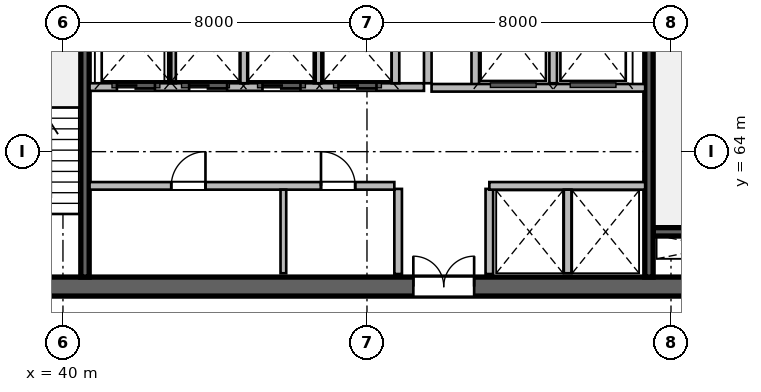
"""IFC4 building model, lengths in metres.
Left out: names, types, materials, properties, quantities, classifications, styles, units other than length and angle.
Written with IfcOpenShell. Run it as: python <this file> out.ifc"""

import sys

from ifc_helpers import new_model, si_unit, direction, frame, frame_2d, origin, place, context, subcontext, project, spatial, rectangle, extrude, source, transform, mapped, element, fill, save


model = new_model("IFC4")
c1 = context("Model", 3, precision=1e-05, world=origin(), true_north=direction((0.0, 1.0)))
c2 = subcontext(c1, "Body", "Model", "MODEL_VIEW")
j1 = project(units=[si_unit("LENGTHUNIT", "METRE"), si_unit("PLANEANGLEUNIT", "RADIAN")], contexts=[c1])
p1 = place(None, origin())
s1 = spatial("IfcSite", under=j1, at=p1, CompositionType="ELEMENT")
p2 = place(p1, origin())
s2 = spatial("IfcBuilding", under=s1, at=p2, CompositionType="ELEMENT")
p3 = place(p2, frame((0.0, 0.0, 115.5)))
s3 = spatial("IfcBuildingStorey", under=s2, at=p3, CompositionType="ELEMENT", Elevation=115.5)
m1 = source(origin(), c2, "Body", "SweptSolid", [
    extrude(rectangle(XDim=21.6, YDim=0.5, at=frame_2d((10.8, 0.0))), origin(), (0.0, 0.0, 1.0), 3.9),
])
p4 = place(p3, frame((37.2, 60.45, 0.0), z_axis=(0.0, 0.0, 1.0), x_axis=(1.0, 0.0, 0.0)))
e1 = element("IfcWall", 1, at=p4, inside=s3, PredefinedType="SHEAR", context=c2, shape_type="MappedRepresentation", body=[
    mapped(m1, transform((0.0, 0.0, 0.0), scale=1.0)),
])
p5 = place(p4, frame((1.1, 0.0, 0.0)))
e2 = element("IfcOpeningElement", 2, at=p5, cuts=e1, PredefinedType="OPENING", context=c2, shape_type="SweptSolid", body=[
    extrude(rectangle(XDim=1.15, YDim=2.15, at=frame_2d((0.575, 1.075))), frame((0.0, 0.26, 0.0), z_axis=(0.0, -1.0, 0.0), x_axis=(1.0, 0.0, 0.0)), (0.0, 0.0, 1.0), 0.52),
])
p6 = place(p4, frame((19.5, 0.0, 0.0)))
e3 = element("IfcOpeningElement", 3, at=p6, cuts=e1, PredefinedType="OPENING", context=c2, shape_type="SweptSolid", body=[
    extrude(rectangle(XDim=0.9, YDim=2.1, at=frame_2d((0.45, 1.05))), frame((0.0, 0.26, 0.0), z_axis=(0.0, -1.0, 0.0), x_axis=(1.0, 0.0, 0.0)), (0.0, 0.0, 1.0), 0.52),
])
p7 = place(p4, frame((12.02, 0.0, 0.0)))
e4 = element("IfcOpeningElement", 4, at=p7, cuts=e1, PredefinedType="OPENING", context=c2, shape_type="SweptSolid", body=[
    extrude(rectangle(XDim=1.6, YDim=2.15, at=frame_2d((0.8, 1.075))), frame((0.0, 0.26, 0.0), z_axis=(0.0, -1.0, 0.0), x_axis=(1.0, 0.0, 0.0)), (0.0, 0.0, 1.0), 0.52),
])
m2 = source(origin(), c2, "Body", "SweptSolid", [
    extrude(rectangle(XDim=3.27, YDim=0.22, at=frame_2d((1.635, 0.0))), origin(), (0.0, 0.0, 1.0), 3.9),
])
p8 = place(p3, frame((55.53, 61.89, 0.0), z_axis=(0.0, 0.0, 1.0), x_axis=(1.0, 0.0, 0.0)))
e5 = element("IfcWall", 5, at=p8, inside=s3, PredefinedType="SHEAR", context=c2, shape_type="MappedRepresentation", body=[
    mapped(m2, transform((0.0, 0.0, 0.0), scale=1.0)),
])
m3 = source(origin(), c2, "Body", "SweptSolid", [
    extrude(rectangle(XDim=11.0, YDim=0.22, at=frame_2d((5.5, 0.0))), origin(), (0.0, 0.0, 1.0), 3.9),
])
p9 = place(p3, frame((40.58, 60.7, 0.0), z_axis=(0.0, 0.0, 1.0), x_axis=(0.0, 1.0, 0.0)))
e6 = element("IfcWall", 6, at=p9, inside=s3, PredefinedType="SHEAR", context=c2, shape_type="MappedRepresentation", body=[
    mapped(m3, transform((0.0, 0.0, 0.0), scale=1.0)),
])
p10 = place(p3, frame((55.42, 60.7, 0.0), z_axis=(0.0, 0.0, 1.0), x_axis=(0.0, 1.0, 0.0)))
e7 = element("IfcWall", 7, at=p10, inside=s3, PredefinedType="SHEAR", context=c2, shape_type="MappedRepresentation", body=[
    mapped(m3, transform((0.0, 0.0, 0.0), scale=1.0)),
])
p11 = place(p10, frame((9.545, 0.0, 0.0)))
e8 = element("IfcOpeningElement", 8, at=p11, cuts=e7, PredefinedType="OPENING", context=c2, shape_type="SweptSolid", body=[
    extrude(rectangle(XDim=1.15, YDim=2.15, at=frame_2d((0.575, 1.075))), frame((0.0, 0.12, 0.0), z_axis=(0.0, -1.0, 0.0), x_axis=(1.0, 0.0, 0.0)), (0.0, 0.0, 1.0), 0.24),
])
m4 = source(origin(), c2, "Body", "SweptSolid", [
    extrude(rectangle(XDim=2.24, YDim=0.2, at=frame_2d((1.12, 0.0))), origin(), (0.0, 0.0, 1.0), 3.65),
])
for number, where, z_axis, x_axis in (
    (9, (48.82, 60.78, 0.0), (0.0, 0.0, 1.0), (0.0, 1.0, 0.0)),
    (10, (51.22, 60.78, 0.0), (0.0, 0.0, 1.0), (0.0, 1.0, 0.0)),
):
    element("IfcWall", number, at=place(p3, frame(where, z_axis=z_axis, x_axis=x_axis)), inside=s3, PredefinedType="SOLIDWALL", context=c2, shape_type="MappedRepresentation", body=[
        mapped(m4, transform((0.0, 0.0, 0.0), scale=1.0)),
    ])
m5 = source(origin(), c2, "Body", "SweptSolid", [
    extrude(rectangle(XDim=5.8, YDim=0.2, at=frame_2d((2.9, 0.0))), origin(), (0.0, 0.0, 1.0), 3.65),
])
p12 = place(p3, frame((49.6, 65.8, 0.0), z_axis=(0.0, 0.0, 1.0), x_axis=(0.0, 1.0, 0.0)))
e11 = element("IfcWall", 11, at=p12, inside=s3, PredefinedType="SOLIDWALL", context=c2, shape_type="MappedRepresentation", body=[
    mapped(m5, transform((0.0, 0.0, 0.0), scale=1.0)),
])
m6 = source(origin(), c2, "Body", "SweptSolid", [
    extrude(rectangle(XDim=2.58, YDim=0.2, at=frame_2d((1.29, 0.0))), origin(), (0.0, 0.0, 1.0), 3.65),
])
p13 = place(p3, frame((50.85, 65.68, 0.0), z_axis=(0.0, 0.0, 1.0), x_axis=(0.0, 1.0, 0.0)))
e12 = element("IfcWall", 12, at=p13, inside=s3, PredefinedType="SOLIDWALL", context=c2, shape_type="MappedRepresentation", body=[
    mapped(m6, transform((0.0, 0.0, 0.0), scale=1.0)),
])
m7 = source(origin(), c2, "Body", "SweptSolid", [
    extrude(rectangle(XDim=2.4, YDim=0.2, at=frame_2d((1.2, 0.0))), origin(), (0.0, 0.0, 1.0), 3.65),
])
p14 = place(p3, frame((52.9, 65.8, 0.0), z_axis=(0.0, 0.0, 1.0), x_axis=(0.0, 1.0, 0.0)))
e13 = element("IfcWall", 13, at=p14, inside=s3, PredefinedType="SOLIDWALL", context=c2, shape_type="MappedRepresentation", body=[
    mapped(m7, transform((0.0, 0.0, 0.0), scale=1.0)),
])
m8 = source(origin(), c2, "Body", "SweptSolid", [
    extrude(rectangle(XDim=5.62, YDim=0.2, at=frame_2d((2.81, 0.0))), origin(), (0.0, 0.0, 1.0), 3.65),
])
p15 = place(p3, frame((49.7, 65.68, 0.0), z_axis=(0.0, 0.0, 1.0), x_axis=(1.0, 0.0, 0.0)))
e14 = element("IfcWall", 14, at=p15, inside=s3, PredefinedType="SOLIDWALL", context=c2, shape_type="MappedRepresentation", body=[
    mapped(m8, transform((0.0, 0.0, 0.0), scale=1.0)),
])
m9 = source(origin(), c2, "Body", "SweptSolid", [
    extrude(rectangle(XDim=8.02, YDim=0.2, at=frame_2d((4.01, 0.0))), origin(), (0.0, 0.0, 1.0), 3.65),
])
p16 = place(p3, frame((40.7, 63.1, 0.0), z_axis=(0.0, 0.0, 1.0), x_axis=(1.0, 0.0, 0.0)))
e15 = element("IfcWall", 15, at=p16, inside=s3, PredefinedType="SOLIDWALL", context=c2, shape_type="MappedRepresentation", body=[
    mapped(m9, transform((0.0, 0.0, 0.0), scale=1.0)),
])
p17 = place(p16, frame((2.15, 0.0, 0.0)))
e16 = element("IfcOpeningElement", 16, at=p17, cuts=e15, PredefinedType="OPENING", context=c2, shape_type="SweptSolid", body=[
    extrude(rectangle(XDim=0.9, YDim=2.1, at=frame_2d((0.45, 1.05))), frame((0.0, 0.11, 0.0), z_axis=(0.0, -1.0, 0.0), x_axis=(1.0, 0.0, 0.0)), (0.0, 0.0, 1.0), 0.22),
])
p18 = place(p16, frame((6.09, 0.0, 0.0)))
e17 = element("IfcOpeningElement", 17, at=p18, cuts=e15, PredefinedType="OPENING", context=c2, shape_type="SweptSolid", body=[
    extrude(rectangle(XDim=0.9, YDim=2.1, at=frame_2d((0.45, 1.05))), frame((0.0, 0.11, 0.0), z_axis=(0.0, -1.0, 0.0), x_axis=(1.0, 0.0, 0.0)), (0.0, 0.0, 1.0), 0.22),
])
m10 = source(origin(), c2, "Body", "SweptSolid", [
    extrude(rectangle(XDim=4.1, YDim=0.2, at=frame_2d((2.05, 0.0))), origin(), (0.0, 0.0, 1.0), 3.65),
])
p19 = place(p3, frame((51.22, 63.1, 0.0), z_axis=(0.0, 0.0, 1.0), x_axis=(1.0, 0.0, 0.0)))
e18 = element("IfcWall", 18, at=p19, inside=s3, PredefinedType="SOLIDWALL", context=c2, shape_type="MappedRepresentation", body=[
    mapped(m10, transform((0.0, 0.0, 0.0), scale=1.0)),
])
m11 = source(origin(), c2, "Body", "SweptSolid", [
    extrude(rectangle(XDim=2.2, YDim=0.15, at=frame_2d((1.1, 0.0))), origin(), (0.0, 0.0, 1.0), 3.65),
])
p20 = place(p3, frame((45.8, 60.8, 0.0), z_axis=(0.0, 0.0, 1.0), x_axis=(0.0, 1.0, 0.0)))
e19 = element("IfcWall", 19, at=p20, inside=s3, PredefinedType="PARTITIONING", context=c2, shape_type="MappedRepresentation", body=[
    mapped(m11, transform((0.0, 0.0, 0.0), scale=1.0)),
])
m12 = source(origin(), c2, "Body", "SweptSolid", [
    extrude(rectangle(XDim=2.2, YDim=0.2, at=frame_2d((1.1, 0.0))), origin(), (0.0, 0.0, 1.0), 3.65),
])
p21 = place(p3, frame((53.28, 60.8, 0.0), z_axis=(0.0, 0.0, 1.0), x_axis=(0.0, 1.0, 0.0)))
e20 = element("IfcWall", 20, at=p21, inside=s3, PredefinedType="SOLIDWALL", context=c2, shape_type="MappedRepresentation", body=[
    mapped(m12, transform((0.0, 0.0, 0.0), scale=1.0)),
])
m13 = source(origin(), c2, "Body", "SweptSolid", [
    extrude(rectangle(XDim=8.8, YDim=0.2, at=frame_2d((4.4, 0.0))), origin(), (0.0, 0.0, 1.0), 3.65),
])
p22 = place(p3, frame((40.7, 65.7, 0.0), z_axis=(0.0, 0.0, 1.0), x_axis=(1.0, 0.0, 0.0)))
e21 = element("IfcWall", 21, at=p22, inside=s3, PredefinedType="SOLIDWALL", context=c2, shape_type="MappedRepresentation", body=[
    mapped(m13, transform((0.0, 0.0, 0.0), scale=1.0)),
])
p23 = place(p22, frame((0.72, 0.0, 0.0)))
e22 = element("IfcOpeningElement", 22, at=p23, cuts=e21, PredefinedType="OPENING", context=c2, shape_type="SweptSolid", body=[
    extrude(rectangle(XDim=1.0, YDim=2.15, at=frame_2d((0.5, 1.075))), frame((0.0, 0.11, 0.0), z_axis=(0.0, -1.0, 0.0), x_axis=(1.0, 0.0, 0.0)), (0.0, 0.0, 1.0), 0.22),
])
p24 = place(p22, frame((2.62, 0.0, 0.0)))
e23 = element("IfcOpeningElement", 23, at=p24, cuts=e21, PredefinedType="OPENING", context=c2, shape_type="SweptSolid", body=[
    extrude(rectangle(XDim=1.0, YDim=2.15, at=frame_2d((0.5, 1.075))), frame((0.0, 0.11, 0.0), z_axis=(0.0, -1.0, 0.0), x_axis=(1.0, 0.0, 0.0)), (0.0, 0.0, 1.0), 0.22),
])
p25 = place(p22, frame((4.55, 0.0, 0.0)))
e24 = element("IfcOpeningElement", 24, at=p25, cuts=e21, PredefinedType="OPENING", context=c2, shape_type="SweptSolid", body=[
    extrude(rectangle(XDim=1.0, YDim=2.15, at=frame_2d((0.5, 1.075))), frame((0.0, 0.11, 0.0), z_axis=(0.0, -1.0, 0.0), x_axis=(1.0, 0.0, 0.0)), (0.0, 0.0, 1.0), 0.22),
])
p26 = place(p22, frame((6.55, 0.0, 0.0)))
e25 = element("IfcOpeningElement", 25, at=p26, cuts=e21, PredefinedType="OPENING", context=c2, shape_type="SweptSolid", body=[
    extrude(rectangle(XDim=1.0, YDim=2.15, at=frame_2d((0.5, 1.075))), frame((0.0, 0.11, 0.0), z_axis=(0.0, -1.0, 0.0), x_axis=(1.0, 0.0, 0.0)), (0.0, 0.0, 1.0), 0.22),
])
for number, where, z_axis, x_axis in (
    (26, (48.75, 65.8, 0.0), (0.0, 0.0, 1.0), (0.0, 1.0, 0.0)),
    (27, (42.87, 65.8, 0.0), (0.0, 0.0, 1.0), (0.0, 1.0, 0.0)),
    (28, (44.77, 65.8, 0.0), (0.0, 0.0, 1.0), (0.0, 1.0, 0.0)),
    (29, (46.7, 65.8, 0.0), (0.0, 0.0, 1.0), (0.0, 1.0, 0.0)),
):
    element("IfcWall", number, at=place(p3, frame(where, z_axis=z_axis, x_axis=x_axis)), inside=s3, PredefinedType="SOLIDWALL", context=c2, shape_type="MappedRepresentation", body=[
        mapped(m7, transform((0.0, 0.0, 0.0), scale=1.0)),
    ])
m14 = source(origin(), c2, "Body", "SweptSolid", [
    extrude(rectangle(XDim=1.6, YDim=2.15, at=frame_2d((0.8, 1.075))), frame((0.0, 0.025, 0.0), z_axis=(0.0, -1.0, 0.0), x_axis=(1.0, 0.0, 0.0)), (0.0, 0.0, 1.0), 0.05),
])
p27 = place(p7, origin())
e30 = element("IfcDoor", 30, at=p27, inside=s3, OperationType="DOUBLE_DOOR_SINGLE_SWING", PredefinedType="DOOR", context=c2, shape_type="MappedRepresentation", body=[
    mapped(m14, transform((0.0, 0.0, 0.0), scale=1.0)),
])
fill(e4, e30)
m15 = source(origin(), c2, "Body", "SweptSolid", [
    extrude(rectangle(XDim=0.9, YDim=2.1, at=frame_2d((0.45, 1.05))), frame((0.0, 0.025, 0.0), z_axis=(0.0, -1.0, 0.0), x_axis=(1.0, 0.0, 0.0)), (0.0, 0.0, 1.0), 0.05),
])
p28 = place(p17, origin())
e31 = element("IfcDoor", 31, at=p28, inside=s3, OperationType="SINGLE_SWING_RIGHT", PredefinedType="DOOR", context=c2, shape_type="MappedRepresentation", body=[
    mapped(m15, transform((0.0, 0.0, 0.0), scale=1.0)),
])
fill(e16, e31)
p29 = place(p18, origin())
e32 = element("IfcDoor", 32, at=p29, inside=s3, OperationType="SINGLE_SWING_LEFT", PredefinedType="DOOR", context=c2, shape_type="MappedRepresentation", body=[
    mapped(m15, transform((0.0, 0.0, 0.0), scale=1.0)),
])
fill(e17, e32)
m16 = source(origin(), c2, "Body", "SweptSolid", [
    extrude(rectangle(XDim=1.0, YDim=2.15, at=frame_2d((0.5, 1.075))), frame((0.0, 0.025, 0.0), z_axis=(0.0, -1.0, 0.0), x_axis=(1.0, 0.0, 0.0)), (0.0, 0.0, 1.0), 0.05),
])
p30 = place(p23, origin())
e33 = element("IfcDoor", 33, at=p30, inside=s3, OperationType="DOUBLE_DOOR_SLIDING", PredefinedType="DOOR", context=c2, shape_type="MappedRepresentation", body=[
    mapped(m16, transform((0.0, 0.0, 0.0), scale=1.0)),
])
fill(e22, e33)
p31 = place(p24, origin())
e34 = element("IfcDoor", 34, at=p31, inside=s3, OperationType="DOUBLE_DOOR_SLIDING", PredefinedType="DOOR", context=c2, shape_type="MappedRepresentation", body=[
    mapped(m16, transform((0.0, 0.0, 0.0), scale=1.0)),
])
fill(e23, e34)
p32 = place(p25, origin())
e35 = element("IfcDoor", 35, at=p32, inside=s3, OperationType="DOUBLE_DOOR_SLIDING", PredefinedType="DOOR", context=c2, shape_type="MappedRepresentation", body=[
    mapped(m16, transform((0.0, 0.0, 0.0), scale=1.0)),
])
fill(e24, e35)
p33 = place(p26, origin())
e36 = element("IfcDoor", 36, at=p33, inside=s3, OperationType="DOUBLE_DOOR_SLIDING", PredefinedType="DOOR", context=c2, shape_type="MappedRepresentation", body=[
    mapped(m16, transform((0.0, 0.0, 0.0), scale=1.0)),
])
fill(e25, e36)
save(model, sys.argv[1])
